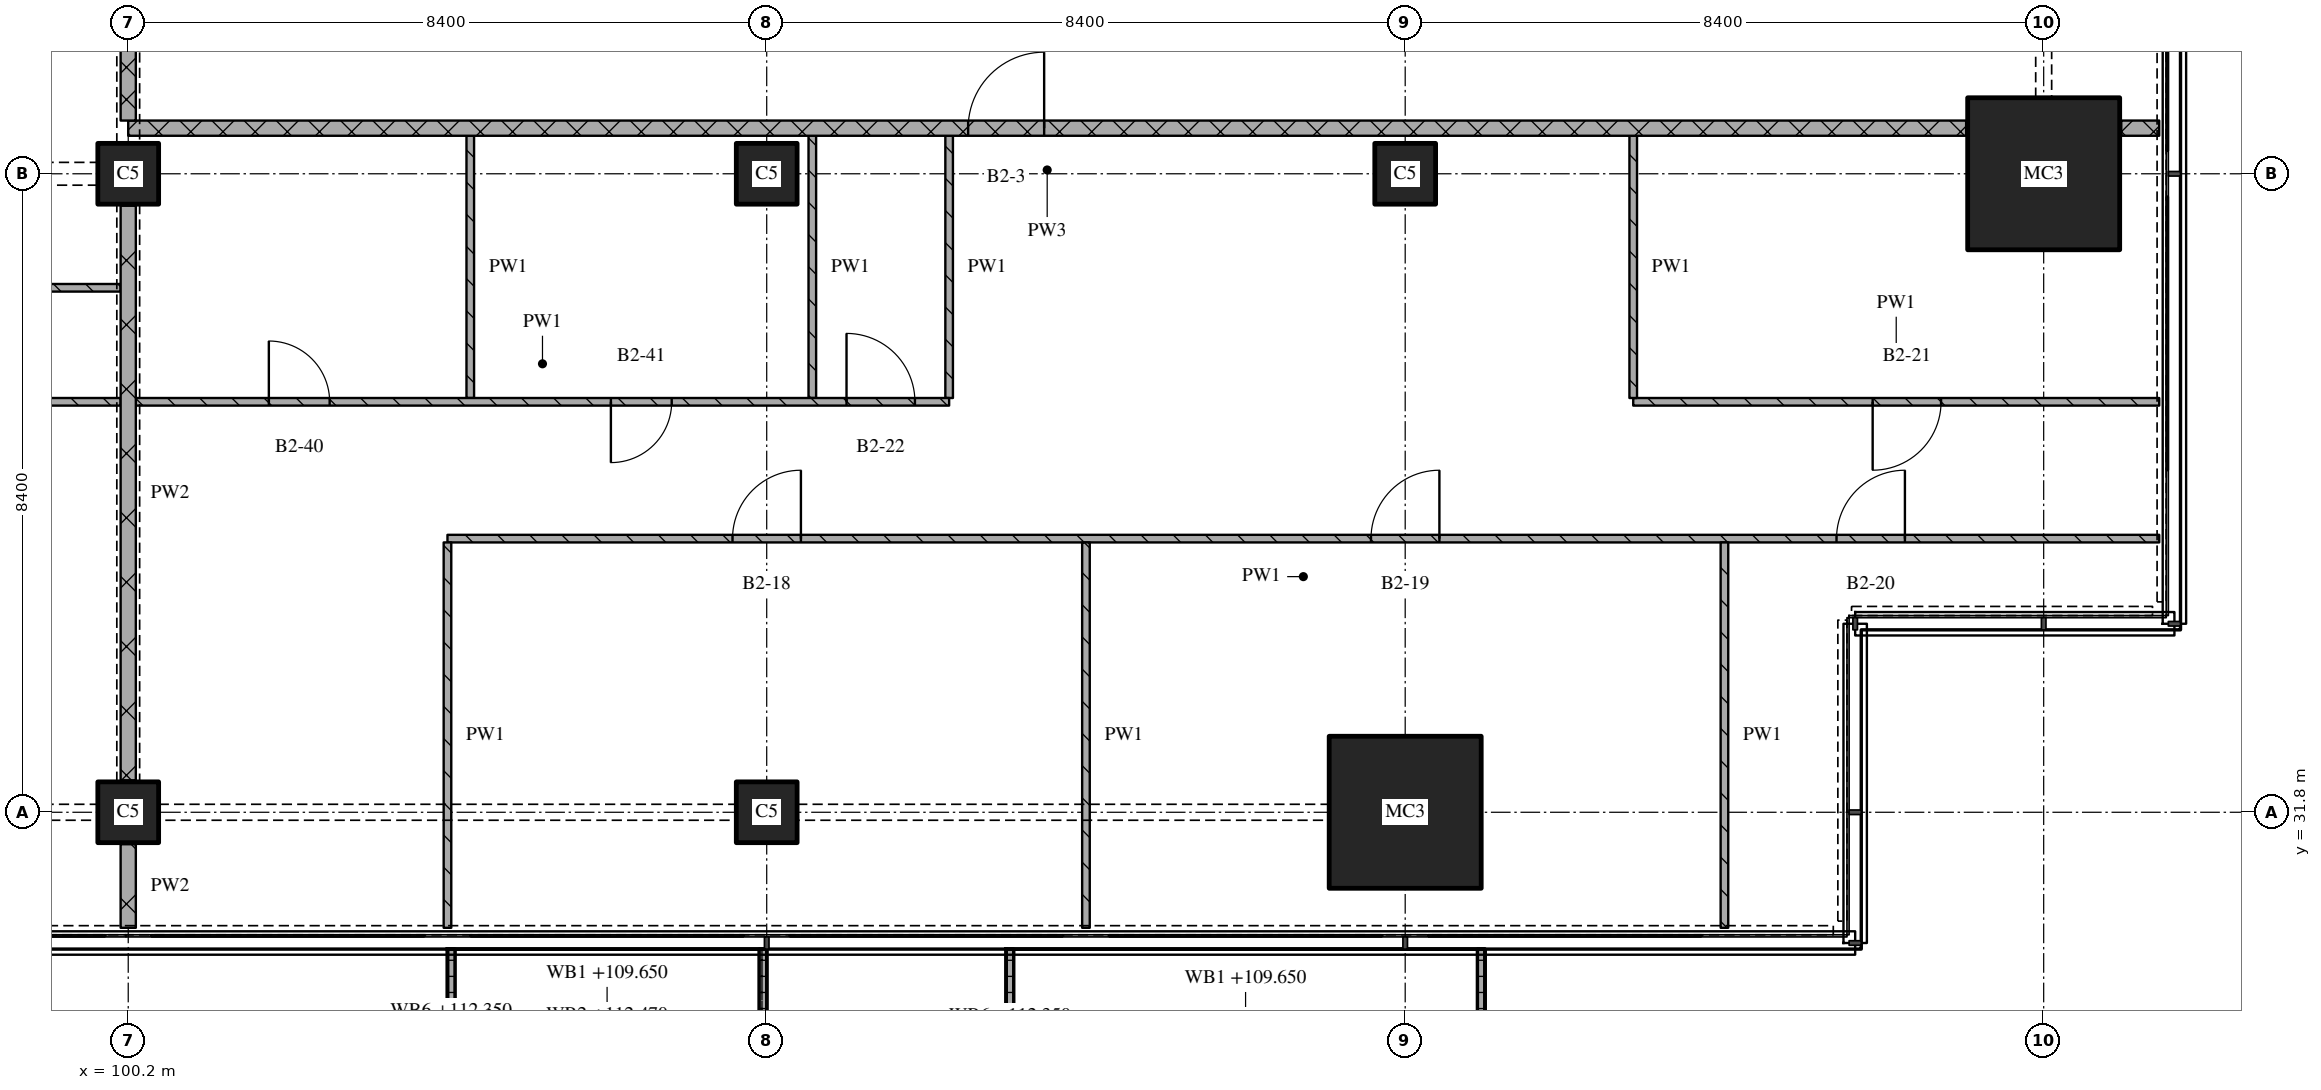
"""IFC4 building model, lengths in metres.
Left out: names, types, materials, properties, quantities, classifications, styles, units other than length and angle.
Written with IfcOpenShell. Run it as: python <this file> out.ifc"""

import sys

from ifc_helpers import new_model, si_unit, direction, frame, frame_2d, origin, origin_2d, place, context, subcontext, project, spatial, polyline, rectangle, outline, extrude, element, fill, save


model = new_model("IFC4")
c1 = context("Model", 3, precision=1e-05, world=origin(), true_north=direction((0.0, 1.0)))
c2 = subcontext(c1, "Body", "Model", "MODEL_VIEW")
j1 = project(units=[si_unit("LENGTHUNIT", "METRE"), si_unit("PLANEANGLEUNIT", "RADIAN")], contexts=[c1])
p1 = place(None, origin())
s1 = spatial("IfcSite", under=j1, at=p1, CompositionType="ELEMENT")
p2 = place(p1, origin())
s2 = spatial("IfcBuilding", under=s1, at=p2, CompositionType="ELEMENT")
p3 = place(p2, frame((0.0, 0.0, 109.65)))
s3 = spatial("IfcBuildingStorey", under=s2, at=p3, CompositionType="ELEMENT", Elevation=109.65)
for number, where, z_axis, x_axis in (
    (1, (100.2, 31.8, 0.0), (0.0, 0.0, 1.0), (1.0, 0.0, 0.0)),
    (2, (100.2, 40.2, 0.0), (0.0, 0.0, 1.0), (1.0, 0.0, 0.0)),
    (3, (108.6, 31.8, 0.0), (0.0, 0.0, 1.0), (1.0, 0.0, 0.0)),
    (4, (108.6, 40.2, 0.0), (0.0, 0.0, 1.0), (1.0, 0.0, 0.0)),
):
    element("IfcColumn", number, at=place(p3, frame(where, z_axis=z_axis, x_axis=x_axis)), inside=s3, PredefinedType="COLUMN", context=c2, shape_type="SweptSolid", body=[
        extrude(rectangle(XDim=0.8, YDim=0.8, at=origin_2d()), origin(), (0.0, 0.0, 1.0), 3.6),
    ])
p4 = place(p3, frame((117.0, 31.8, 0.0), z_axis=(0.0, 0.0, 1.0), x_axis=(1.0, 0.0, 0.0)))
e5 = element("IfcColumn", 5, at=p4, inside=s3, PredefinedType="COLUMN", context=c2, shape_type="SweptSolid", body=[
    extrude(rectangle(XDim=2.0, YDim=2.0, at=origin_2d()), origin(), (0.0, 0.0, 1.0), 3.6),
])
p5 = place(p3, frame((117.0, 40.2, 0.0), z_axis=(0.0, 0.0, 1.0), x_axis=(1.0, 0.0, 0.0)))
e6 = element("IfcColumn", 6, at=p5, inside=s3, PredefinedType="COLUMN", context=c2, shape_type="SweptSolid", body=[
    extrude(rectangle(XDim=0.8, YDim=0.8, at=origin_2d()), origin(), (0.0, 0.0, 1.0), 3.6),
])
p6 = place(p3, frame((125.4, 40.2, 0.0), z_axis=(0.0, 0.0, 1.0), x_axis=(1.0, 0.0, 0.0)))
e7 = element("IfcColumn", 7, at=p6, inside=s3, PredefinedType="COLUMN", context=c2, shape_type="SweptSolid", body=[
    extrude(rectangle(XDim=2.0, YDim=2.0, at=origin_2d()), origin(), (0.0, 0.0, 1.0), 3.6),
])
p7 = place(p3, origin())
e8 = element("IfcWall", 8, at=p7, inside=s3, PredefinedType="SOLIDWALL", context=c2, shape_type="SweptSolid", body=[
    extrude(outline(polyline([(104.4, 30.0), (104.5, 30.0), (104.5, 28.367), (108.5, 28.367), (108.5, 30.0), (108.6, 30.0), (108.6, 28.267), (104.4, 28.267), (104.4, 30.0)])), origin(), (0.0, 0.0, 1.0), 1.0),
])
p8 = place(p3, origin())
e9 = element("IfcWall", 9, at=p8, inside=s3, PredefinedType="SOLIDWALL", context=c2, shape_type="SweptSolid", body=[
    extrude(outline(polyline([(111.75, 30.0), (111.85, 30.0), (111.85, 28.233), (117.95, 28.233), (117.95, 30.0), (118.05, 30.0), (118.05, 28.133), (111.75, 28.133), (111.75, 30.0)])), origin(), (0.0, 0.0, 1.0), 1.0),
])
p9 = place(p3, frame((126.92, 35.4, 0.0), z_axis=(0.0, 0.0, 1.0), x_axis=(-1.0, 0.0, 0.0)))
e10 = element("IfcWall", 10, at=p9, inside=s3, PredefinedType="PARTITIONING", context=c2, shape_type="SweptSolid", body=[
    extrude(rectangle(XDim=22.52, YDim=0.1, at=frame_2d((11.26, 0.0))), origin(), (0.0, 0.0, 1.0), 3.32),
])
p10 = place(p9, frame((3.346, 0.0, 0.0)))
e11 = element("IfcOpeningElement", 11, at=p10, cuts=e10, PredefinedType="OPENING", context=c2, shape_type="SweptSolid", body=[
    extrude(rectangle(XDim=0.9, YDim=2.1, at=frame_2d((0.45, 1.05))), frame((0.0, 0.06, 0.0), z_axis=(0.0, -1.0, 0.0), x_axis=(1.0, 0.0, 0.0)), (0.0, 0.0, 1.0), 0.12),
])
p11 = place(p9, frame((9.47, 0.0, 0.0)))
e12 = element("IfcOpeningElement", 12, at=p11, cuts=e10, PredefinedType="OPENING", context=c2, shape_type="SweptSolid", body=[
    extrude(rectangle(XDim=0.9, YDim=2.1, at=frame_2d((0.45, 1.05))), frame((0.0, 0.06, 0.0), z_axis=(0.0, -1.0, 0.0), x_axis=(1.0, 0.0, 0.0)), (0.0, 0.0, 1.0), 0.12),
])
p12 = place(p9, frame((17.87, 0.0, 0.0)))
e13 = element("IfcOpeningElement", 13, at=p12, cuts=e10, PredefinedType="OPENING", context=c2, shape_type="SweptSolid", body=[
    extrude(rectangle(XDim=0.9, YDim=2.1, at=frame_2d((0.45, 1.05))), frame((0.0, 0.06, 0.0), z_axis=(0.0, -1.0, 0.0), x_axis=(1.0, 0.0, 0.0)), (0.0, 0.0, 1.0), 0.12),
])
p13 = place(p3, frame((120.0, 37.2, 0.0), z_axis=(0.0, 0.0, 1.0), x_axis=(1.0, 0.0, 0.0)))
e14 = element("IfcWall", 14, at=p13, inside=s3, PredefinedType="PARTITIONING", context=c2, shape_type="SweptSolid", body=[
    extrude(rectangle(XDim=6.92, YDim=0.1, at=frame_2d((3.46, 0.0))), origin(), (0.0, 0.0, 1.0), 3.32),
])
p14 = place(p13, frame((3.15, 0.0, 0.0)))
e15 = element("IfcOpeningElement", 15, at=p14, cuts=e14, PredefinedType="OPENING", context=c2, shape_type="SweptSolid", body=[
    extrude(rectangle(XDim=0.9, YDim=2.1, at=frame_2d((0.45, 1.05))), frame((0.0, 0.06, 0.0), z_axis=(0.0, -1.0, 0.0), x_axis=(1.0, 0.0, 0.0)), (0.0, 0.0, 1.0), 0.12),
])
p15 = place(p3, frame((95.1, 38.7, 0.0), z_axis=(0.0, 0.0, 1.0), x_axis=(1.0, 0.0, 0.0)))
e16 = element("IfcWall", 16, at=p15, inside=s3, PredefinedType="PARTITIONING", context=c2, shape_type="SweptSolid", body=[
    extrude(rectangle(XDim=5.0, YDim=0.1, at=frame_2d((2.5, 0.0))), origin(), (0.0, 0.0, 1.0), 3.32),
])
p16 = place(p15, frame((2.1, 0.0, 0.0)))
e17 = element("IfcOpeningElement", 17, at=p16, cuts=e16, PredefinedType="OPENING", context=c2, shape_type="SweptSolid", body=[
    extrude(rectangle(XDim=0.9, YDim=2.1, at=frame_2d((0.45, 1.05))), frame((0.0, 0.06, 0.0), z_axis=(0.0, -1.0, 0.0), x_axis=(1.0, 0.0, 0.0)), (0.0, 0.0, 1.0), 0.12),
])
p17 = place(p3, frame((124.38, 40.8, 0.0), z_axis=(0.0, 0.0, 1.0), x_axis=(-1.0, 0.0, 0.0)))
e18 = element("IfcWall", 18, at=p17, inside=s3, PredefinedType="PARTITIONING", context=c2, shape_type="SweptSolid", body=[
    extrude(rectangle(XDim=24.18, YDim=0.2, at=frame_2d((12.09, 0.0))), origin(), (0.0, 0.0, 1.0), 3.32),
])
p18 = place(p17, frame((12.13, 0.0, 0.0)))
e19 = element("IfcOpeningElement", 19, at=p18, cuts=e18, PredefinedType="OPENING", context=c2, shape_type="SweptSolid", body=[
    extrude(rectangle(XDim=1.0, YDim=2.1, at=frame_2d((0.5, 1.05))), frame((0.0, 0.11, 0.0), z_axis=(0.0, -1.0, 0.0), x_axis=(1.0, 0.0, 0.0)), (0.0, 0.0, 1.0), 0.22),
])
p19 = place(p3, frame((126.42, 40.8, 0.0), z_axis=(0.0, 0.0, 1.0), x_axis=(1.0, 0.0, 0.0)))
e20 = element("IfcWall", 20, at=p19, inside=s3, PredefinedType="PARTITIONING", context=c2, shape_type="SweptSolid", body=[
    extrude(rectangle(XDim=0.5, YDim=0.2, at=frame_2d((0.25, 0.0))), origin(), (0.0, 0.0, 1.0), 3.32),
])
p20 = place(p3, frame((100.2, 43.1, 0.0), z_axis=(0.0, 0.0, 1.0), x_axis=(0.0, -1.0, 0.0)))
e21 = element("IfcWall", 21, at=p20, inside=s3, PredefinedType="PARTITIONING", context=c2, shape_type="SweptSolid", body=[
    extrude(rectangle(XDim=2.2, YDim=0.2, at=frame_2d((1.1, 0.0))), origin(), (0.0, 0.0, 1.0), 2.43),
])
p21 = place(p3, frame((100.2, 31.38, 0.0), z_axis=(0.0, 0.0, 1.0), x_axis=(0.0, -1.0, 0.0)))
e22 = element("IfcWall", 22, at=p21, inside=s3, PredefinedType="PARTITIONING", context=c2, shape_type="SweptSolid", body=[
    extrude(rectangle(XDim=1.1, YDim=0.2, at=frame_2d((0.55, 0.0))), origin(), (0.0, 0.0, 1.0), 3.32),
])
p22 = place(p3, frame((100.2, 39.78, 0.0), z_axis=(0.0, 0.0, 1.0), x_axis=(0.0, -1.0, 0.0)))
e23 = element("IfcWall", 23, at=p22, inside=s3, PredefinedType="PARTITIONING", context=c2, shape_type="SweptSolid", body=[
    extrude(rectangle(XDim=7.56, YDim=0.2, at=frame_2d((3.78, 0.0))), origin(), (0.0, 0.0, 1.0), 2.83),
])
p23 = place(p3, frame((104.4, 35.35, 0.0), z_axis=(0.0, 0.0, 1.0), x_axis=(0.0, -1.0, 0.0)))
e24 = element("IfcWall", 24, at=p23, inside=s3, PredefinedType="PARTITIONING", context=c2, shape_type="SweptSolid", body=[
    extrude(rectangle(XDim=5.07, YDim=0.1, at=frame_2d((2.535, 0.0))), origin(), (0.0, 0.0, 1.0), 3.32),
])
for number, where, z_axis, x_axis in (
    (25, (104.7, 40.7, 0.0), (0.0, 0.0, 1.0), (0.0, -1.0, 0.0)),
    (26, (109.2, 40.7, 0.0), (0.0, 0.0, 1.0), (0.0, -1.0, 0.0)),
    (27, (111.0, 40.7, 0.0), (0.0, 0.0, 1.0), (0.0, -1.0, 0.0)),
):
    element("IfcWall", number, at=place(p3, frame(where, z_axis=z_axis, x_axis=x_axis)), inside=s3, PredefinedType="PARTITIONING", context=c2, shape_type="SweptSolid", body=[
        extrude(rectangle(XDim=3.45, YDim=0.1, at=frame_2d((1.725, 0.0))), origin(), (0.0, 0.0, 1.0), 3.32),
    ])
p24 = place(p3, frame((112.8, 35.35, 0.0), z_axis=(0.0, 0.0, 1.0), x_axis=(0.0, -1.0, 0.0)))
e28 = element("IfcWall", 28, at=p24, inside=s3, PredefinedType="PARTITIONING", context=c2, shape_type="SweptSolid", body=[
    extrude(rectangle(XDim=5.07, YDim=0.1, at=frame_2d((2.535, 0.0))), origin(), (0.0, 0.0, 1.0), 3.32),
])
p25 = place(p3, frame((120.0, 40.7, 0.0), z_axis=(0.0, 0.0, 1.0), x_axis=(0.0, -1.0, 0.0)))
e29 = element("IfcWall", 29, at=p25, inside=s3, PredefinedType="PARTITIONING", context=c2, shape_type="SweptSolid", body=[
    extrude(rectangle(XDim=3.45, YDim=0.1, at=frame_2d((1.725, 0.0))), origin(), (0.0, 0.0, 1.0), 3.32),
])
p26 = place(p3, frame((121.2, 35.35, 0.0), z_axis=(0.0, 0.0, 1.0), x_axis=(0.0, -1.0, 0.0)))
e30 = element("IfcWall", 30, at=p26, inside=s3, PredefinedType="PARTITIONING", context=c2, shape_type="SweptSolid", body=[
    extrude(rectangle(XDim=5.07, YDim=0.1, at=frame_2d((2.535, 0.0))), origin(), (0.0, 0.0, 1.0), 3.32),
])
p27 = place(p3, frame((100.1, 37.2, 0.0), z_axis=(0.0, 0.0, 1.0), x_axis=(-1.0, 0.0, 0.0)))
e31 = element("IfcWall", 31, at=p27, inside=s3, PredefinedType="PARTITIONING", context=c2, shape_type="SweptSolid", body=[
    extrude(rectangle(XDim=12.5, YDim=0.1, at=frame_2d((6.25, 0.0))), origin(), (0.0, 0.0, 1.0), 3.32),
])
p28 = place(p27, frame((1.55, 0.0, 0.0)))
e32 = element("IfcOpeningElement", 32, at=p28, cuts=e31, PredefinedType="OPENING", context=c2, shape_type="SweptSolid", body=[
    extrude(rectangle(XDim=0.9, YDim=2.1, at=frame_2d((0.45, 1.05))), frame((0.0, 0.06, 0.0), z_axis=(0.0, -1.0, 0.0), x_axis=(1.0, 0.0, 0.0)), (0.0, 0.0, 1.0), 0.12),
])
p29 = place(p27, frame((7.85, 0.0, 0.0)))
e33 = element("IfcOpeningElement", 33, at=p29, cuts=e31, PredefinedType="OPENING", context=c2, shape_type="SweptSolid", body=[
    extrude(rectangle(XDim=0.9, YDim=2.1, at=frame_2d((0.45, 1.05))), frame((0.0, 0.06, 0.0), z_axis=(0.0, -1.0, 0.0), x_axis=(1.0, 0.0, 0.0)), (0.0, 0.0, 1.0), 0.12),
])
p30 = place(p3, frame((100.3, 37.2, 0.0), z_axis=(0.0, 0.0, 1.0), x_axis=(1.0, 0.0, 0.0)))
e34 = element("IfcWall", 34, at=p30, inside=s3, PredefinedType="PARTITIONING", context=c2, shape_type="SweptSolid", body=[
    extrude(rectangle(XDim=10.7, YDim=0.1, at=frame_2d((5.35, 0.0))), origin(), (0.0, 0.0, 1.0), 3.32),
])
p31 = place(p30, frame((1.75, 0.0, 0.0)))
e35 = element("IfcOpeningElement", 35, at=p31, cuts=e34, PredefinedType="OPENING", context=c2, shape_type="SweptSolid", body=[
    extrude(rectangle(XDim=0.8, YDim=2.1, at=frame_2d((0.4, 1.05))), frame((0.0, 0.06, 0.0), z_axis=(0.0, -1.0, 0.0), x_axis=(1.0, 0.0, 0.0)), (0.0, 0.0, 1.0), 0.12),
])
p32 = place(p30, frame((6.25, 0.0, 0.0)))
e36 = element("IfcOpeningElement", 36, at=p32, cuts=e34, PredefinedType="OPENING", context=c2, shape_type="SweptSolid", body=[
    extrude(rectangle(XDim=0.8, YDim=2.1, at=frame_2d((0.4, 1.05))), frame((0.0, 0.06, 0.0), z_axis=(0.0, -1.0, 0.0), x_axis=(1.0, 0.0, 0.0)), (0.0, 0.0, 1.0), 0.12),
])
p33 = place(p30, frame((9.35, 0.0, 0.0)))
e37 = element("IfcOpeningElement", 37, at=p33, cuts=e34, PredefinedType="OPENING", context=c2, shape_type="SweptSolid", body=[
    extrude(rectangle(XDim=0.9, YDim=2.1, at=frame_2d((0.45, 1.05))), frame((0.0, 0.06, 0.0), z_axis=(0.0, -1.0, 0.0), x_axis=(1.0, 0.0, 0.0)), (0.0, 0.0, 1.0), 0.12),
])
p34 = place(p10, origin())
e38 = element("IfcDoor", 38, at=p34, inside=s3, OperationType="SINGLE_SWING_RIGHT", PredefinedType="DOOR", context=c2, shape_type="SweptSolid", body=[
    extrude(rectangle(XDim=0.9, YDim=2.1, at=frame_2d((0.45, 1.05))), frame((0.0, 0.025, 0.0), z_axis=(0.0, -1.0, 0.0), x_axis=(1.0, 0.0, 0.0)), (0.0, 0.0, 1.0), 0.05),
])
fill(e11, e38)
p35 = place(p11, origin())
e39 = element("IfcDoor", 39, at=p35, inside=s3, OperationType="SINGLE_SWING_RIGHT", PredefinedType="DOOR", context=c2, shape_type="SweptSolid", body=[
    extrude(rectangle(XDim=0.9, YDim=2.1, at=frame_2d((0.45, 1.05))), frame((0.0, 0.025, 0.0), z_axis=(0.0, -1.0, 0.0), x_axis=(1.0, 0.0, 0.0)), (0.0, 0.0, 1.0), 0.05),
])
fill(e12, e39)
p36 = place(p12, origin())
e40 = element("IfcDoor", 40, at=p36, inside=s3, OperationType="SINGLE_SWING_RIGHT", PredefinedType="DOOR", context=c2, shape_type="SweptSolid", body=[
    extrude(rectangle(XDim=0.9, YDim=2.1, at=frame_2d((0.45, 1.05))), frame((0.0, 0.025, 0.0), z_axis=(0.0, -1.0, 0.0), x_axis=(1.0, 0.0, 0.0)), (0.0, 0.0, 1.0), 0.05),
])
fill(e13, e40)
p37 = place(p14, origin())
e41 = element("IfcDoor", 41, at=p37, inside=s3, OperationType="SINGLE_SWING_RIGHT", PredefinedType="DOOR", context=c2, shape_type="SweptSolid", body=[
    extrude(rectangle(XDim=0.9, YDim=2.1, at=frame_2d((0.45, 1.05))), frame((0.0, 0.025, 0.0), z_axis=(0.0, -1.0, 0.0), x_axis=(1.0, 0.0, 0.0)), (0.0, 0.0, 1.0), 0.05),
])
fill(e15, e41)
p38 = place(p18, origin())
e42 = element("IfcDoor", 42, at=p38, inside=s3, OperationType="SINGLE_SWING_RIGHT", PredefinedType="DOOR", context=c2, shape_type="SweptSolid", body=[
    extrude(rectangle(XDim=1.0, YDim=2.1, at=frame_2d((0.5, 1.05))), frame((0.0, 0.025, 0.0), z_axis=(0.0, -1.0, 0.0), x_axis=(1.0, 0.0, 0.0)), (0.0, 0.0, 1.0), 0.05),
])
fill(e19, e42)
p39 = place(p31, origin())
e43 = element("IfcDoor", 43, at=p39, inside=s3, OperationType="SINGLE_SWING_LEFT", PredefinedType="DOOR", context=c2, shape_type="SweptSolid", body=[
    extrude(rectangle(XDim=0.8, YDim=2.1, at=frame_2d((0.4, 1.05))), frame((0.0, 0.025, 0.0), z_axis=(0.0, -1.0, 0.0), x_axis=(1.0, 0.0, 0.0)), (0.0, 0.0, 1.0), 0.05),
])
fill(e35, e43)
p40 = place(p32, origin())
e44 = element("IfcDoor", 44, at=p40, inside=s3, OperationType="SINGLE_SWING_RIGHT", PredefinedType="DOOR", context=c2, shape_type="SweptSolid", body=[
    extrude(rectangle(XDim=0.8, YDim=2.1, at=frame_2d((0.4, 1.05))), frame((0.0, 0.025, 0.0), z_axis=(0.0, -1.0, 0.0), x_axis=(1.0, 0.0, 0.0)), (0.0, 0.0, 1.0), 0.05),
])
fill(e36, e44)
p41 = place(p33, origin())
e45 = element("IfcDoor", 45, at=p41, inside=s3, OperationType="SINGLE_SWING_LEFT", PredefinedType="DOOR", context=c2, shape_type="SweptSolid", body=[
    extrude(rectangle(XDim=0.9, YDim=2.1, at=frame_2d((0.45, 1.05))), frame((0.0, 0.025, 0.0), z_axis=(0.0, -1.0, 0.0), x_axis=(1.0, 0.0, 0.0)), (0.0, 0.0, 1.0), 0.05),
])
fill(e37, e45)
save(model, sys.argv[1])
